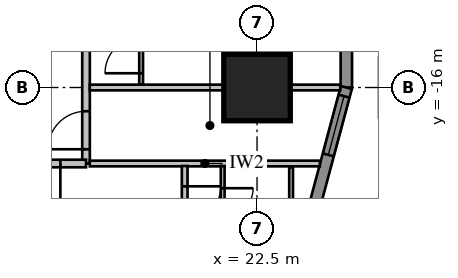
"""IFC4 building model, lengths in metres.
Left out: names, types, materials, properties, quantities, classifications, styles, units other than length and angle.
Written with IfcOpenShell. Run it as: python <this file> out.ifc"""

import sys

from ifc_helpers import new_model, si_unit, direction, frame, frame_2d, origin, origin_2d, place, context, subcontext, project, spatial, rectangle, extrude, element, fill, save


model = new_model("IFC4")
c1 = context("Model", 3, precision=1e-05, world=origin(), true_north=direction((0.0, 1.0)))
c2 = subcontext(c1, "Body", "Model", "MODEL_VIEW")
j1 = project(units=[si_unit("LENGTHUNIT", "METRE"), si_unit("PLANEANGLEUNIT", "RADIAN")], contexts=[c1])
p1 = place(None, origin())
s1 = spatial("IfcSite", under=j1, at=p1, CompositionType="ELEMENT")
p2 = place(p1, origin())
s2 = spatial("IfcBuilding", under=s1, at=p2, CompositionType="ELEMENT")
p3 = place(p2, frame((0.0, 0.0, 31.4)))
s3 = spatial("IfcBuildingStorey", under=s2, at=p3, CompositionType="ELEMENT", Elevation=31.4)
p4 = place(p3, frame((22.5, -16.0, 0.0), z_axis=(0.0, 0.0, 1.0), x_axis=(1.0, 0.0, 0.0)))
e1 = element("IfcColumn", 1, at=p4, inside=s3, PredefinedType="COLUMN", context=c2, shape_type="SweptSolid", body=[
    extrude(rectangle(XDim=1.75, YDim=1.75, at=origin_2d()), origin(), (0.0, 0.0, 1.0), 3.85),
])
p5 = place(p3, frame((24.85, -16.0, 0.0), z_axis=(0.0, 0.0, 1.0), x_axis=(0.0, 1.0, 0.0)))
e2 = element("IfcWall", 2, at=p5, inside=s3, PredefinedType="SOLIDWALL", context=c2, shape_type="SweptSolid", body=[
    extrude(rectangle(XDim=32.0, YDim=0.3, at=frame_2d((16.0, 0.0))), origin(), (0.0, 0.0, 1.0), 3.65),
])
p6 = place(p5, frame((1.2, 0.0, 0.75)))
e3 = element("IfcOpeningElement", 3, at=p6, cuts=e2, PredefinedType="OPENING", context=c2, shape_type="SweptSolid", body=[
    extrude(rectangle(XDim=1.6, YDim=1.8, at=frame_2d((0.8, 0.9))), frame((0.0, 0.17, 0.0), z_axis=(0.0, -1.0, 0.0), x_axis=(1.0, 0.0, 0.0)), (0.0, 0.0, 1.0), 0.34),
])
p7 = place(p5, frame((5.2, 0.0, 0.75)))
e4 = element("IfcOpeningElement", 4, at=p7, cuts=e2, PredefinedType="OPENING", context=c2, shape_type="SweptSolid", body=[
    extrude(rectangle(XDim=1.6, YDim=1.8, at=frame_2d((0.8, 0.9))), frame((0.0, 0.17, 0.0), z_axis=(0.0, -1.0, 0.0), x_axis=(1.0, 0.0, 0.0)), (0.0, 0.0, 1.0), 0.34),
])
p8 = place(p5, frame((17.2, 0.0, 0.75)))
e5 = element("IfcOpeningElement", 5, at=p8, cuts=e2, PredefinedType="OPENING", context=c2, shape_type="SweptSolid", body=[
    extrude(rectangle(XDim=1.6, YDim=1.8, at=frame_2d((0.8, 0.9))), frame((0.0, 0.17, 0.0), z_axis=(0.0, -1.0, 0.0), x_axis=(1.0, 0.0, 0.0)), (0.0, 0.0, 1.0), 0.34),
])
p9 = place(p5, frame((21.2, 0.0, 0.75)))
e6 = element("IfcOpeningElement", 6, at=p9, cuts=e2, PredefinedType="OPENING", context=c2, shape_type="SweptSolid", body=[
    extrude(rectangle(XDim=1.6, YDim=1.8, at=frame_2d((0.8, 0.9))), frame((0.0, 0.17, 0.0), z_axis=(0.0, -1.0, 0.0), x_axis=(1.0, 0.0, 0.0)), (0.0, 0.0, 1.0), 0.34),
])
p10 = place(p5, frame((25.2, 0.0, 0.75)))
e7 = element("IfcOpeningElement", 7, at=p10, cuts=e2, PredefinedType="OPENING", context=c2, shape_type="SweptSolid", body=[
    extrude(rectangle(XDim=1.6, YDim=1.8, at=frame_2d((0.8, 0.9))), frame((0.0, 0.17, 0.0), z_axis=(0.0, -1.0, 0.0), x_axis=(1.0, 0.0, 0.0)), (0.0, 0.0, 1.0), 0.34),
])
p11 = place(p5, frame((29.2, 0.0, 0.75)))
e8 = element("IfcOpeningElement", 8, at=p11, cuts=e2, PredefinedType="OPENING", context=c2, shape_type="SweptSolid", body=[
    extrude(rectangle(XDim=1.6, YDim=1.8, at=frame_2d((0.8, 0.9))), frame((0.0, 0.17, 0.0), z_axis=(0.0, -1.0, 0.0), x_axis=(1.0, 0.0, 0.0)), (0.0, 0.0, 1.0), 0.34),
])
p12 = place(p5, frame((8.8, 0.0, 0.75)))
e9 = element("IfcOpeningElement", 9, at=p12, cuts=e2, PredefinedType="OPENING", context=c2, shape_type="SweptSolid", body=[
    extrude(rectangle(XDim=2.4, YDim=1.8, at=frame_2d((1.2, 0.9))), frame((0.0, 0.17, 0.0), z_axis=(0.0, -1.0, 0.0), x_axis=(1.0, 0.0, 0.0)), (0.0, 0.0, 1.0), 0.34),
])
p13 = place(p5, frame((13.812, 0.0, 0.0)))
e10 = element("IfcOpeningElement", 10, at=p13, cuts=e2, PredefinedType="OPENING", context=c2, shape_type="SweptSolid", body=[
    extrude(rectangle(XDim=1.0, YDim=2.4, at=frame_2d((0.5, 1.2))), frame((0.0, 0.17, 0.0), z_axis=(0.0, -1.0, 0.0), x_axis=(1.0, 0.0, 0.0)), (0.0, 0.0, 1.0), 0.34),
])
p14 = place(p3, frame((23.664, -20.425, 0.0), z_axis=(0.0, 0.0, 1.0), x_axis=(0.258839972501, 0.965920218567, 0.0)))
e11 = element("IfcWall", 11, at=p14, inside=s3, PredefinedType="SOLIDWALL", context=c2, shape_type="SweptSolid", body=[
    extrude(rectangle(XDim=4.581, YDim=0.3, at=frame_2d((2.291, 0.0))), origin(), (0.0, 0.0, 1.0), 3.65),
])
p15 = place(p14, frame((2.746, 0.0, 0.75)))
e12 = element("IfcOpeningElement", 12, at=p15, cuts=e11, PredefinedType="OPENING", context=c2, shape_type="SweptSolid", body=[
    extrude(rectangle(XDim=1.6, YDim=1.8, at=frame_2d((0.8, 0.9))), frame((0.0, 0.17, 0.0), z_axis=(0.0, -1.0, 0.0), x_axis=(1.0, 0.0, 0.0)), (0.0, 0.0, 1.0), 0.34),
])
p16 = place(p3, frame((18.0, -18.0, 0.0), z_axis=(0.0, 0.0, 1.0), x_axis=(0.0, 1.0, 0.0)))
e13 = element("IfcWall", 13, at=p16, inside=s3, PredefinedType="PARTITIONING", context=c2, shape_type="SweptSolid", body=[
    extrude(rectangle(XDim=36.0, YDim=0.2, at=frame_2d((18.0, 0.0))), origin(), (0.0, 0.0, 1.0), 3.65),
])
p17 = place(p16, frame((10.4, 0.0, 0.0)))
e14 = element("IfcOpeningElement", 14, at=p17, cuts=e13, PredefinedType="OPENING", context=c2, shape_type="SweptSolid", body=[
    extrude(rectangle(XDim=1.0, YDim=2.1, at=frame_2d((0.5, 1.05))), frame((0.0, 0.12, 0.0), z_axis=(0.0, -1.0, 0.0), x_axis=(1.0, 0.0, 0.0)), (0.0, 0.0, 1.0), 0.24),
])
p18 = place(p16, frame((0.375, 0.0, 0.0)))
e15 = element("IfcOpeningElement", 15, at=p18, cuts=e13, PredefinedType="OPENING", context=c2, shape_type="SweptSolid", body=[
    extrude(rectangle(XDim=1.0, YDim=2.1, at=frame_2d((0.5, 1.05))), frame((0.0, 0.12, 0.0), z_axis=(0.0, -1.0, 0.0), x_axis=(1.0, 0.0, 0.0)), (0.0, 0.0, 1.0), 0.24),
])
p19 = place(p16, frame((34.375, 0.0, 0.0)))
e16 = element("IfcOpeningElement", 16, at=p19, cuts=e13, PredefinedType="OPENING", context=c2, shape_type="SweptSolid", body=[
    extrude(rectangle(XDim=0.95, YDim=2.1, at=frame_2d((0.475, 1.05))), frame((0.0, 0.12, 0.0), z_axis=(0.0, -1.0, 0.0), x_axis=(1.0, 0.0, 0.0)), (0.0, 0.0, 1.0), 0.24),
])
p20 = place(p3, frame((19.45, -15.925, 0.0), z_axis=(0.0, 0.0, 1.0), x_axis=(0.0, 1.0, 0.0)))
e17 = element("IfcWall", 17, at=p20, inside=s3, PredefinedType="PARTITIONING", context=c2, shape_type="SweptSolid", body=[
    extrude(rectangle(XDim=31.85, YDim=0.1, at=frame_2d((15.925, 0.0))), origin(), (0.0, 0.0, 1.0), 3.65),
])
p21 = place(p20, frame((10.125, 0.0, 0.0)))
e18 = element("IfcOpeningElement", 18, at=p21, cuts=e17, PredefinedType="OPENING", context=c2, shape_type="SweptSolid", body=[
    extrude(rectangle(XDim=1.0, YDim=2.1, at=frame_2d((0.5, 1.05))), frame((0.0, 0.07, 0.0), z_axis=(0.0, -1.0, 0.0), x_axis=(1.0, 0.0, 0.0)), (0.0, 0.0, 1.0), 0.14),
])
p22 = place(p20, frame((8.3, 0.0, 0.0)))
e19 = element("IfcOpeningElement", 19, at=p22, cuts=e17, PredefinedType="OPENING", context=c2, shape_type="SweptSolid", body=[
    extrude(rectangle(XDim=0.8, YDim=2.1, at=frame_2d((0.4, 1.05))), frame((0.0, 0.07, 0.0), z_axis=(0.0, -1.0, 0.0), x_axis=(1.0, 0.0, 0.0)), (0.0, 0.0, 1.0), 0.14),
])
p23 = place(p20, frame((0.3, 0.0, 0.0)))
e20 = element("IfcOpeningElement", 20, at=p23, cuts=e17, PredefinedType="OPENING", context=c2, shape_type="SweptSolid", body=[
    extrude(rectangle(XDim=0.95, YDim=2.1, at=frame_2d((0.475, 1.05))), frame((0.0, 0.07, 0.0), z_axis=(0.0, -1.0, 0.0), x_axis=(1.0, 0.0, 0.0)), (0.0, 0.0, 1.0), 0.14),
])
p24 = place(p20, frame((6.175, 0.0, 0.0)))
e21 = element("IfcOpeningElement", 21, at=p24, cuts=e17, PredefinedType="OPENING", context=c2, shape_type="SweptSolid", body=[
    extrude(rectangle(XDim=0.95, YDim=2.1, at=frame_2d((0.475, 1.05))), frame((0.0, 0.07, 0.0), z_axis=(0.0, -1.0, 0.0), x_axis=(1.0, 0.0, 0.0)), (0.0, 0.0, 1.0), 0.14),
])
p25 = place(p20, frame((16.3, 0.0, 0.0)))
e22 = element("IfcOpeningElement", 22, at=p25, cuts=e17, PredefinedType="OPENING", context=c2, shape_type="SweptSolid", body=[
    extrude(rectangle(XDim=0.95, YDim=2.1, at=frame_2d((0.475, 1.05))), frame((0.0, 0.07, 0.0), z_axis=(0.0, -1.0, 0.0), x_axis=(1.0, 0.0, 0.0)), (0.0, 0.0, 1.0), 0.14),
])
p26 = place(p20, frame((22.175, 0.0, 0.0)))
e23 = element("IfcOpeningElement", 23, at=p26, cuts=e17, PredefinedType="OPENING", context=c2, shape_type="SweptSolid", body=[
    extrude(rectangle(XDim=0.95, YDim=2.1, at=frame_2d((0.475, 1.05))), frame((0.0, 0.07, 0.0), z_axis=(0.0, -1.0, 0.0), x_axis=(1.0, 0.0, 0.0)), (0.0, 0.0, 1.0), 0.14),
])
p27 = place(p20, frame((24.3, 0.0, 0.0)))
e24 = element("IfcOpeningElement", 24, at=p27, cuts=e17, PredefinedType="OPENING", context=c2, shape_type="SweptSolid", body=[
    extrude(rectangle(XDim=0.95, YDim=2.1, at=frame_2d((0.475, 1.05))), frame((0.0, 0.07, 0.0), z_axis=(0.0, -1.0, 0.0), x_axis=(1.0, 0.0, 0.0)), (0.0, 0.0, 1.0), 0.14),
])
p28 = place(p20, frame((30.175, 0.0, 0.0)))
e25 = element("IfcOpeningElement", 25, at=p28, cuts=e17, PredefinedType="OPENING", context=c2, shape_type="SweptSolid", body=[
    extrude(rectangle(XDim=0.95, YDim=2.1, at=frame_2d((0.475, 1.05))), frame((0.0, 0.07, 0.0), z_axis=(0.0, -1.0, 0.0), x_axis=(1.0, 0.0, 0.0)), (0.0, 0.0, 1.0), 0.14),
])
p29 = place(p3, frame((18.1, -18.0, 0.0), z_axis=(0.0, 0.0, 1.0), x_axis=(1.0, 0.0, 0.0)))
e26 = element("IfcWall", 26, at=p29, inside=s3, PredefinedType="PARTITIONING", context=c2, shape_type="SweptSolid", body=[
    extrude(rectangle(XDim=6.053, YDim=0.15, at=frame_2d((3.027, 0.0))), origin(), (0.0, 0.0, 1.0), 3.65),
])
p30 = place(p3, frame((18.1, -16.0, 0.0), z_axis=(0.0, 0.0, 1.0), x_axis=(1.0, 0.0, 0.0)))
e27 = element("IfcWall", 27, at=p30, inside=s3, PredefinedType="PARTITIONING", context=c2, shape_type="SweptSolid", body=[
    extrude(rectangle(XDim=6.589, YDim=0.15, at=frame_2d((3.295, 0.0))), origin(), (0.0, 0.0, 1.0), 3.65),
])
p31 = place(p3, frame((-18.0, -18.0, 0.0), z_axis=(0.0, 0.0, 1.0), x_axis=(1.0, 0.0, 0.0)))
e28 = element("IfcWall", 28, at=p31, inside=s3, PredefinedType="PARTITIONING", context=c2, shape_type="SweptSolid", body=[
    extrude(rectangle(XDim=36.0, YDim=0.2, at=frame_2d((18.0, 0.0))), origin(), (0.0, 0.0, 1.0), 3.65),
])
p32 = place(p31, frame((0.375, 0.0, 0.0)))
e29 = element("IfcOpeningElement", 29, at=p32, cuts=e28, PredefinedType="OPENING", context=c2, shape_type="SweptSolid", body=[
    extrude(rectangle(XDim=1.0, YDim=2.1, at=frame_2d((0.5, 1.05))), frame((0.0, 0.12, 0.0), z_axis=(0.0, -1.0, 0.0), x_axis=(1.0, 0.0, 0.0)), (0.0, 0.0, 1.0), 0.24),
])
p33 = place(p31, frame((2.45, 0.0, 0.0)))
e30 = element("IfcOpeningElement", 30, at=p33, cuts=e28, PredefinedType="OPENING", context=c2, shape_type="SweptSolid", body=[
    extrude(rectangle(XDim=0.8, YDim=2.1, at=frame_2d((0.4, 1.05))), frame((0.0, 0.12, 0.0), z_axis=(0.0, -1.0, 0.0), x_axis=(1.0, 0.0, 0.0)), (0.0, 0.0, 1.0), 0.24),
])
p34 = place(p31, frame((4.05, 0.0, 0.0)))
e31 = element("IfcOpeningElement", 31, at=p34, cuts=e28, PredefinedType="OPENING", context=c2, shape_type="SweptSolid", body=[
    extrude(rectangle(XDim=1.0, YDim=2.1, at=frame_2d((0.5, 1.05))), frame((0.0, 0.12, 0.0), z_axis=(0.0, -1.0, 0.0), x_axis=(1.0, 0.0, 0.0)), (0.0, 0.0, 1.0), 0.24),
])
p35 = place(p31, frame((6.45, 0.0, 0.0)))
e32 = element("IfcOpeningElement", 32, at=p35, cuts=e28, PredefinedType="OPENING", context=c2, shape_type="SweptSolid", body=[
    extrude(rectangle(XDim=0.9, YDim=2.1, at=frame_2d((0.45, 1.05))), frame((0.0, 0.12, 0.0), z_axis=(0.0, -1.0, 0.0), x_axis=(1.0, 0.0, 0.0)), (0.0, 0.0, 1.0), 0.24),
])
p36 = place(p31, frame((8.15, 0.0, 0.0)))
e33 = element("IfcOpeningElement", 33, at=p36, cuts=e28, PredefinedType="OPENING", context=c2, shape_type="SweptSolid", body=[
    extrude(rectangle(XDim=1.0, YDim=2.1, at=frame_2d((0.5, 1.05))), frame((0.0, 0.12, 0.0), z_axis=(0.0, -1.0, 0.0), x_axis=(1.0, 0.0, 0.0)), (0.0, 0.0, 1.0), 0.24),
])
p37 = place(p31, frame((18.375, 0.0, 0.0)))
e34 = element("IfcOpeningElement", 34, at=p37, cuts=e28, PredefinedType="OPENING", context=c2, shape_type="SweptSolid", body=[
    extrude(rectangle(XDim=0.95, YDim=2.1, at=frame_2d((0.475, 1.05))), frame((0.0, 0.12, 0.0), z_axis=(0.0, -1.0, 0.0), x_axis=(1.0, 0.0, 0.0)), (0.0, 0.0, 1.0), 0.24),
])
p38 = place(p31, frame((24.25, 0.0, 0.0)))
e35 = element("IfcOpeningElement", 35, at=p38, cuts=e28, PredefinedType="OPENING", context=c2, shape_type="SweptSolid", body=[
    extrude(rectangle(XDim=0.95, YDim=2.1, at=frame_2d((0.475, 1.05))), frame((0.0, 0.12, 0.0), z_axis=(0.0, -1.0, 0.0), x_axis=(1.0, 0.0, 0.0)), (0.0, 0.0, 1.0), 0.24),
])
p39 = place(p31, frame((26.375, 0.0, 0.0)))
e36 = element("IfcOpeningElement", 36, at=p39, cuts=e28, PredefinedType="OPENING", context=c2, shape_type="SweptSolid", body=[
    extrude(rectangle(XDim=0.95, YDim=2.1, at=frame_2d((0.475, 1.05))), frame((0.0, 0.12, 0.0), z_axis=(0.0, -1.0, 0.0), x_axis=(1.0, 0.0, 0.0)), (0.0, 0.0, 1.0), 0.24),
])
p40 = place(p31, frame((32.25, 0.0, 0.0)))
e37 = element("IfcOpeningElement", 37, at=p40, cuts=e28, PredefinedType="OPENING", context=c2, shape_type="SweptSolid", body=[
    extrude(rectangle(XDim=0.95, YDim=2.1, at=frame_2d((0.475, 1.05))), frame((0.0, 0.12, 0.0), z_axis=(0.0, -1.0, 0.0), x_axis=(1.0, 0.0, 0.0)), (0.0, 0.0, 1.0), 0.24),
])
p41 = place(p31, frame((34.375, 0.0, 0.0)))
e38 = element("IfcOpeningElement", 38, at=p41, cuts=e28, PredefinedType="OPENING", context=c2, shape_type="SweptSolid", body=[
    extrude(rectangle(XDim=0.95, YDim=2.1, at=frame_2d((0.475, 1.05))), frame((0.0, 0.12, 0.0), z_axis=(0.0, -1.0, 0.0), x_axis=(1.0, 0.0, 0.0)), (0.0, 0.0, 1.0), 0.24),
])
p42 = place(p31, frame((11.2, 0.0, 0.0)))
e39 = element("IfcOpeningElement", 39, at=p42, cuts=e28, PredefinedType="OPENING", context=c2, shape_type="SweptSolid", body=[
    extrude(rectangle(XDim=1.0, YDim=2.1, at=frame_2d((0.5, 1.05))), frame((0.0, 0.12, 0.0), z_axis=(0.0, -1.0, 0.0), x_axis=(1.0, 0.0, 0.0)), (0.0, 0.0, 1.0), 0.24),
])
p43 = place(p3, frame((21.596, -18.065, 0.0), z_axis=(0.0, 0.0, 1.0), x_axis=(0.0, -1.0, 0.0)))
e40 = element("IfcWall", 40, at=p43, inside=s3, PredefinedType="PARTITIONING", context=c2, shape_type="SweptSolid", body=[
    extrude(rectangle(XDim=2.335, YDim=0.1, at=frame_2d((1.167, 0.0))), origin(), (0.0, 0.0, 1.0), 3.65),
])
p44 = place(p43, frame((0.585, 0.0, 0.0)))
e41 = element("IfcOpeningElement", 41, at=p44, cuts=e40, PredefinedType="OPENING", context=c2, shape_type="SweptSolid", body=[
    extrude(rectangle(XDim=0.8, YDim=2.1, at=frame_2d((0.4, 1.05))), frame((0.0, 0.07, 0.0), z_axis=(0.0, -1.0, 0.0), x_axis=(1.0, 0.0, 0.0)), (0.0, 0.0, 1.0), 0.14),
])
p45 = place(p3, frame((23.396, -18.1, 0.0), z_axis=(0.0, 0.0, 1.0), x_axis=(0.0, -1.0, 0.0)))
e42 = element("IfcWall", 42, at=p45, inside=s3, PredefinedType="PARTITIONING", context=c2, shape_type="SweptSolid", body=[
    extrude(rectangle(XDim=2.3, YDim=0.1, at=frame_2d((1.15, 0.0))), origin(), (0.0, 0.0, 1.0), 3.65),
])
p46 = place(p3, frame((20.596, -18.065, 0.0), z_axis=(0.0, 0.0, 1.0), x_axis=(0.0, -1.0, 0.0)))
e43 = element("IfcWall", 43, at=p46, inside=s3, PredefinedType="PARTITIONING", context=c2, shape_type="SweptSolid", body=[
    extrude(rectangle(XDim=5.209, YDim=0.15, at=frame_2d((2.604, 0.0))), origin(), (0.0, 0.0, 1.0), 3.65),
])
p47 = place(p46, frame((0.535, 0.0, 0.0)))
e44 = element("IfcOpeningElement", 44, at=p47, cuts=e43, PredefinedType="OPENING", context=c2, shape_type="SweptSolid", body=[
    extrude(rectangle(XDim=0.95, YDim=2.1, at=frame_2d((0.475, 1.05))), frame((0.0, 0.095, 0.0), z_axis=(0.0, -1.0, 0.0), x_axis=(1.0, 0.0, 0.0)), (0.0, 0.0, 1.0), 0.19),
])
p48 = place(p15, origin())
e45 = element("IfcWindow", 45, at=p48, inside=s3, PartitioningType="SINGLE_PANEL", PredefinedType="WINDOW", context=c2, shape_type="SweptSolid", body=[
    extrude(rectangle(XDim=1.6, YDim=1.8, at=frame_2d((0.8, 0.9))), frame((0.0, 0.03, 0.0), z_axis=(0.0, -1.0, 0.0), x_axis=(1.0, 0.0, 0.0)), (0.0, 0.0, 1.0), 0.06),
])
fill(e12, e45)
p49 = place(p18, origin())
e46 = element("IfcDoor", 46, at=p49, inside=s3, OperationType="SINGLE_SWING_LEFT", PredefinedType="DOOR", context=c2, shape_type="SweptSolid", body=[
    extrude(rectangle(XDim=1.0, YDim=2.1, at=frame_2d((0.5, 1.05))), frame((0.0, 0.025, 0.0), z_axis=(0.0, -1.0, 0.0), x_axis=(1.0, 0.0, 0.0)), (0.0, 0.0, 1.0), 0.05),
])
fill(e15, e46)
p50 = place(p23, origin())
e47 = element("IfcDoor", 47, at=p50, inside=s3, OperationType="SINGLE_SWING_LEFT", PredefinedType="DOOR", context=c2, shape_type="SweptSolid", body=[
    extrude(rectangle(XDim=0.95, YDim=2.1, at=frame_2d((0.475, 1.05))), frame((0.0, 0.025, 0.0), z_axis=(0.0, -1.0, 0.0), x_axis=(1.0, 0.0, 0.0)), (0.0, 0.0, 1.0), 0.05),
])
fill(e20, e47)
p51 = place(p41, origin())
e48 = element("IfcDoor", 48, at=p51, inside=s3, OperationType="SINGLE_SWING_RIGHT", PredefinedType="DOOR", context=c2, shape_type="SweptSolid", body=[
    extrude(rectangle(XDim=0.95, YDim=2.1, at=frame_2d((0.475, 1.05))), frame((0.0, 0.025, 0.0), z_axis=(0.0, -1.0, 0.0), x_axis=(1.0, 0.0, 0.0)), (0.0, 0.0, 1.0), 0.05),
])
fill(e38, e48)
p52 = place(p44, origin())
e49 = element("IfcDoor", 49, at=p52, inside=s3, OperationType="SINGLE_SWING_LEFT", PredefinedType="DOOR", context=c2, shape_type="SweptSolid", body=[
    extrude(rectangle(XDim=0.8, YDim=2.1, at=frame_2d((0.4, 1.05))), frame((0.0, 0.025, 0.0), z_axis=(0.0, -1.0, 0.0), x_axis=(1.0, 0.0, 0.0)), (0.0, 0.0, 1.0), 0.05),
])
fill(e41, e49)
p53 = place(p47, origin())
e50 = element("IfcDoor", 50, at=p53, inside=s3, OperationType="SINGLE_SWING_LEFT", PredefinedType="DOOR", context=c2, shape_type="SweptSolid", body=[
    extrude(rectangle(XDim=0.95, YDim=2.1, at=frame_2d((0.475, 1.05))), frame((0.0, 0.025, 0.0), z_axis=(0.0, -1.0, 0.0), x_axis=(1.0, 0.0, 0.0)), (0.0, 0.0, 1.0), 0.05),
])
fill(e44, e50)
save(model, sys.argv[1])
